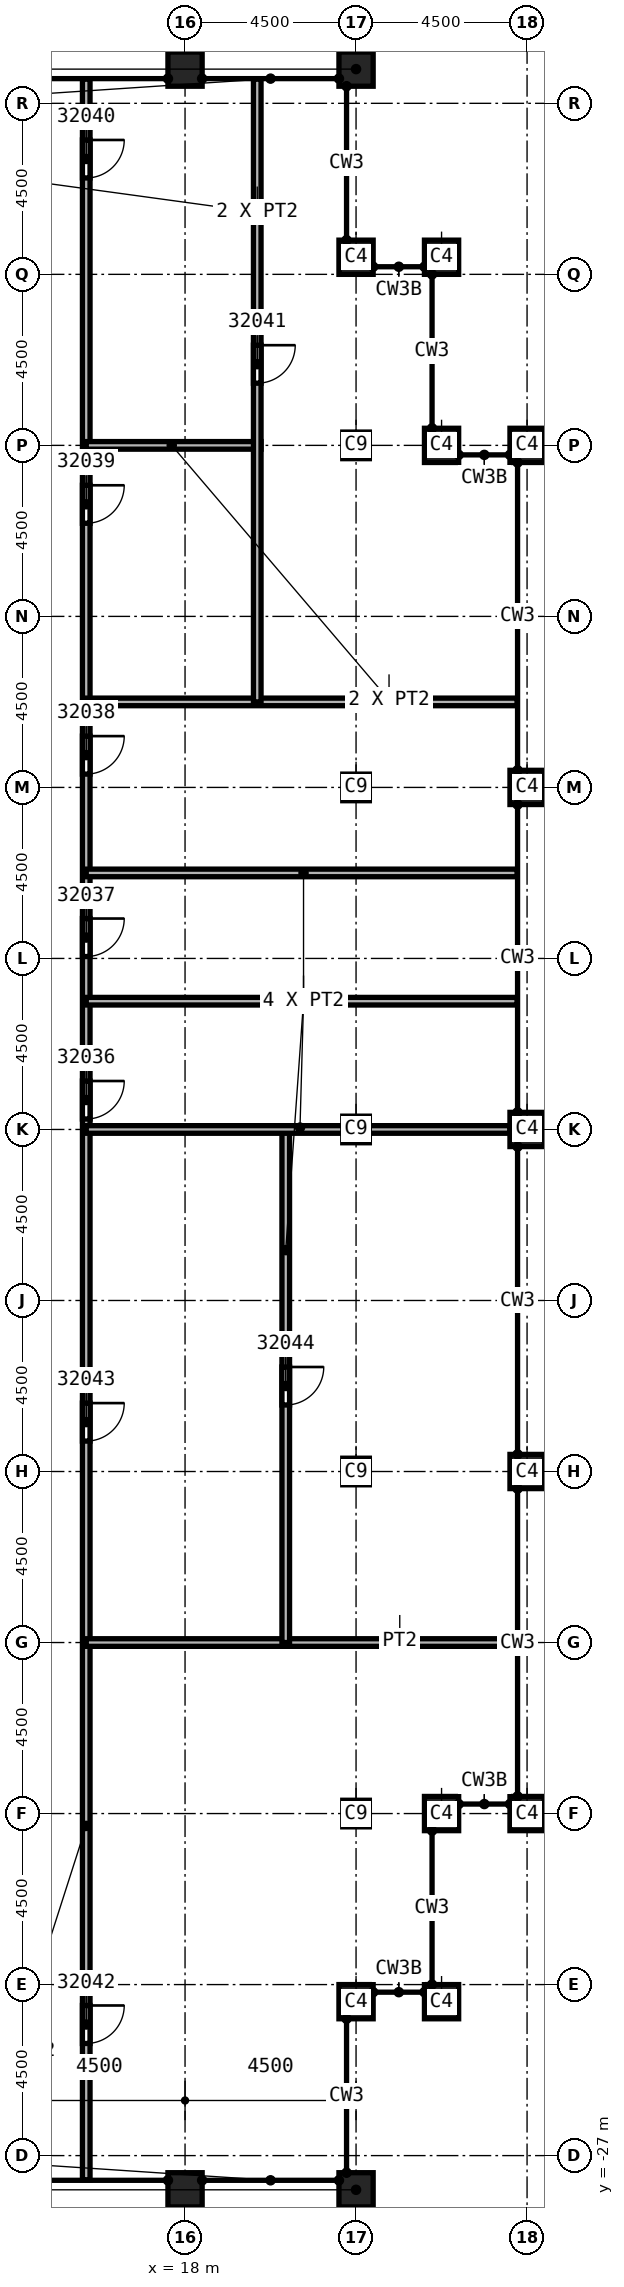
"""IFC4 building model, lengths in metres.
Left out: names, types, materials, properties, quantities, classifications, styles, units other than length and angle.
Written with IfcOpenShell. Run it as: python <this file> out.ifc"""

import sys

from ifc_helpers import new_model, si_unit, direction, frame, frame_2d, origin, origin_2d, place, context, subcontext, project, spatial, rectangle, extrude, element, fill, save


model = new_model("IFC4")
c1 = context("Model", 3, precision=1e-05, world=origin(), true_north=direction((0.0, 1.0)))
c2 = subcontext(c1, "Body", "Model", "MODEL_VIEW")
j1 = project(units=[si_unit("LENGTHUNIT", "METRE"), si_unit("PLANEANGLEUNIT", "RADIAN")], contexts=[c1])
p1 = place(None, origin())
s1 = spatial("IfcSite", under=j1, at=p1, CompositionType="ELEMENT")
p2 = place(p1, origin())
s2 = spatial("IfcBuilding", under=s1, at=p2, CompositionType="ELEMENT")
p3 = place(p2, frame((0.0, 0.0, 356.0)))
s3 = spatial("IfcBuildingStorey", under=s2, at=p3, CompositionType="ELEMENT", Elevation=356.0)
for number, where, z_axis, x_axis in (
    (1, (22.5, 0.0, 0.0), (0.0, 0.0, 1.0), (1.0, 0.0, 0.0)),
    (2, (22.5, 9.0, 0.0), (0.0, 0.0, 1.0), (1.0, 0.0, 0.0)),
    (3, (22.5, 18.0, 0.0), (0.0, 0.0, 1.0), (1.0, 0.0, 0.0)),
    (4, (22.5, -9.0, 0.0), (0.0, 0.0, 1.0), (1.0, 0.0, 0.0)),
    (5, (22.5, -18.0, 0.0), (0.0, 0.0, 1.0), (1.0, 0.0, 0.0)),
):
    element("IfcColumn", number, at=place(p3, frame(where, z_axis=z_axis, x_axis=x_axis)), inside=s3, PredefinedType="COLUMN", context=c2, shape_type="SweptSolid", body=[
        extrude(rectangle(XDim=0.7, YDim=0.7, at=origin_2d()), origin(), (0.0, 0.0, 1.0), 4.6),
    ])
for number, where, z_axis, x_axis in (
    (6, (27.0, 0.0, 0.0), (0.0, 0.0, 1.0), (0.0, 1.0, 0.0)),
    (7, (27.0, 9.0, 0.0), (0.0, 0.0, 1.0), (0.0, 1.0, 0.0)),
    (8, (27.0, 18.0, 0.0), (0.0, 0.0, 1.0), (0.0, 1.0, 0.0)),
    (9, (27.0, -9.0, 0.0), (0.0, 0.0, 1.0), (0.0, 1.0, 0.0)),
    (10, (27.0, -18.0, 0.0), (0.0, 0.0, 1.0), (0.0, 1.0, 0.0)),
    (11, (18.0, 27.9, 0.0), (0.0, 0.0, 1.0), (1.0, 0.0, 0.0)),
    (12, (22.5, 27.9, 0.0), (0.0, 0.0, 1.0), (1.0, 0.0, 0.0)),
    (13, (18.0, -27.9, 0.0), (0.0, 0.0, 1.0), (1.0, 0.0, 0.0)),
    (14, (22.5, -27.9, 0.0), (0.0, 0.0, 1.0), (1.0, 0.0, 0.0)),
    (15, (22.5, 22.95, 0.0), (0.0, 0.0, 1.0), (1.0, 0.0, 0.0)),
    (16, (24.75, 22.95, 0.0), (0.0, 0.0, 1.0), (1.0, 0.0, 0.0)),
    (17, (24.75, 18.0, 0.0), (0.0, 0.0, 1.0), (1.0, 0.0, 0.0)),
    (18, (22.5, -22.95, 0.0), (0.0, 0.0, 1.0), (1.0, 0.0, 0.0)),
    (19, (24.75, -22.95, 0.0), (0.0, 0.0, 1.0), (1.0, 0.0, 0.0)),
    (20, (24.75, -18.0, 0.0), (0.0, 0.0, 1.0), (1.0, 0.0, 0.0)),
):
    element("IfcColumn", number, at=place(p3, frame(where, z_axis=z_axis, x_axis=x_axis)), inside=s3, PredefinedType="COLUMN", context=c2, shape_type="SweptSolid", body=[
        extrude(rectangle(XDim=0.9, YDim=0.9, at=origin_2d()), origin(), (0.0, 0.0, 1.0), 4.6),
    ])
p4 = place(p3, frame((15.4, 27.636, 0.0), z_axis=(0.0, 0.0, 1.0), x_axis=(0.0, -1.0, 0.0)))
e21 = element("IfcWall", 21, at=p4, inside=s3, PredefinedType="PARTITIONING", context=c2, shape_type="SweptSolid", body=[
    extrude(rectangle(XDim=55.272, YDim=0.2, at=frame_2d((27.636, 0.0))), origin(), (0.0, 0.0, 1.0), 4.15),
])
p5 = place(p4, frame((26.361, 0.0, 0.0)))
e22 = element("IfcOpeningElement", 22, at=p5, cuts=e21, PredefinedType="OPENING", context=c2, shape_type="SweptSolid", body=[
    extrude(rectangle(XDim=1.0, YDim=2.1, at=frame_2d((0.5, 1.05))), frame((0.0, 0.1, 0.0), z_axis=(0.0, -1.0, 0.0), x_axis=(1.0, 0.0, 0.0)), (0.0, 0.0, 1.0), 0.2),
])
p6 = place(p4, frame((22.086, 0.0, 0.0)))
e23 = element("IfcOpeningElement", 23, at=p6, cuts=e21, PredefinedType="OPENING", context=c2, shape_type="SweptSolid", body=[
    extrude(rectangle(XDim=1.0, YDim=2.1, at=frame_2d((0.5, 1.05))), frame((0.0, 0.1, 0.0), z_axis=(0.0, -1.0, 0.0), x_axis=(1.0, 0.0, 0.0)), (0.0, 0.0, 1.0), 0.2),
])
p7 = place(p4, frame((17.286, 0.0, 0.0)))
e24 = element("IfcOpeningElement", 24, at=p7, cuts=e21, PredefinedType="OPENING", context=c2, shape_type="SweptSolid", body=[
    extrude(rectangle(XDim=1.0, YDim=2.1, at=frame_2d((0.5, 1.05))), frame((0.0, 0.1, 0.0), z_axis=(0.0, -1.0, 0.0), x_axis=(1.0, 0.0, 0.0)), (0.0, 0.0, 1.0), 0.2),
])
p8 = place(p4, frame((10.686, 0.0, 0.0)))
e25 = element("IfcOpeningElement", 25, at=p8, cuts=e21, PredefinedType="OPENING", context=c2, shape_type="SweptSolid", body=[
    extrude(rectangle(XDim=1.0, YDim=2.1, at=frame_2d((0.5, 1.05))), frame((0.0, 0.1, 0.0), z_axis=(0.0, -1.0, 0.0), x_axis=(1.0, 0.0, 0.0)), (0.0, 0.0, 1.0), 0.2),
])
p9 = place(p4, frame((1.6, 0.0, 0.0)))
e26 = element("IfcOpeningElement", 26, at=p9, cuts=e21, PredefinedType="OPENING", context=c2, shape_type="SweptSolid", body=[
    extrude(rectangle(XDim=1.0, YDim=2.1, at=frame_2d((0.5, 1.05))), frame((0.0, 0.1, 0.0), z_axis=(0.0, -1.0, 0.0), x_axis=(1.0, 0.0, 0.0)), (0.0, 0.0, 1.0), 0.2),
])
p10 = place(p4, frame((50.686, 0.0, 0.0)))
e27 = element("IfcOpeningElement", 27, at=p10, cuts=e21, PredefinedType="OPENING", context=c2, shape_type="SweptSolid", body=[
    extrude(rectangle(XDim=1.0, YDim=2.1, at=frame_2d((0.5, 1.05))), frame((0.0, 0.1, 0.0), z_axis=(0.0, -1.0, 0.0), x_axis=(1.0, 0.0, 0.0)), (0.0, 0.0, 1.0), 0.2),
])
p11 = place(p4, frame((34.836, 0.0, 0.0)))
e28 = element("IfcOpeningElement", 28, at=p11, cuts=e21, PredefinedType="OPENING", context=c2, shape_type="SweptSolid", body=[
    extrude(rectangle(XDim=1.0, YDim=2.1, at=frame_2d((0.5, 1.05))), frame((0.0, 0.1, 0.0), z_axis=(0.0, -1.0, 0.0), x_axis=(1.0, 0.0, 0.0)), (0.0, 0.0, 1.0), 0.2),
])
p12 = place(p3, frame((15.4, -13.5, 0.0), z_axis=(0.0, 0.0, 1.0), x_axis=(1.0, 0.0, 0.0)))
e29 = element("IfcWall", 29, at=p12, inside=s3, PredefinedType="PARTITIONING", context=c2, shape_type="SweptSolid", body=[
    extrude(rectangle(XDim=11.15, YDim=0.2, at=frame_2d((5.575, 0.0))), origin(), (0.0, 0.0, 1.0), 4.15),
])
for number, where, z_axis, x_axis in (
    (30, (15.4, 3.375, 0.0), (0.0, 0.0, 1.0), (1.0, 0.0, 0.0)),
    (31, (15.4, 6.75, 0.0), (0.0, 0.0, 1.0), (1.0, 0.0, 0.0)),
    (32, (15.4, 11.25, 0.0), (0.0, 0.0, 1.0), (1.0, 0.0, 0.0)),
):
    element("IfcWall", number, at=place(p3, frame(where, z_axis=z_axis, x_axis=x_axis)), inside=s3, PredefinedType="PARTITIONING", context=c2, shape_type="SweptSolid", body=[
        extrude(rectangle(XDim=11.336, YDim=0.2, at=frame_2d((5.668, 0.0))), origin(), (0.0, 0.0, 1.0), 4.15),
    ])
p13 = place(p3, frame((15.4, 18.0, 0.0), z_axis=(0.0, 0.0, 1.0), x_axis=(1.0, 0.0, 0.0)))
e33 = element("IfcWall", 33, at=p13, inside=s3, PredefinedType="PARTITIONING", context=c2, shape_type="SweptSolid", body=[
    extrude(rectangle(XDim=4.6, YDim=0.2, at=frame_2d((2.3, 0.0))), origin(), (0.0, 0.0, 1.0), 4.15),
])
p14 = place(p3, frame((19.9, 27.636, 0.0), z_axis=(0.0, 0.0, 1.0), x_axis=(0.0, -1.0, 0.0)))
e34 = element("IfcWall", 34, at=p14, inside=s3, PredefinedType="PARTITIONING", context=c2, shape_type="SweptSolid", body=[
    extrude(rectangle(XDim=16.386, YDim=0.2, at=frame_2d((8.193, 0.0))), origin(), (0.0, 0.0, 1.0), 4.15),
])
p15 = place(p14, frame((7.0, 0.0, 0.0)))
e35 = element("IfcOpeningElement", 35, at=p15, cuts=e34, PredefinedType="OPENING", context=c2, shape_type="SweptSolid", body=[
    extrude(rectangle(XDim=1.0, YDim=2.1, at=frame_2d((0.5, 1.05))), frame((0.0, 0.1, 0.0), z_axis=(0.0, -1.0, 0.0), x_axis=(1.0, 0.0, 0.0)), (0.0, 0.0, 1.0), 0.2),
])
p16 = place(p3, frame((20.65, 0.0, 0.0), z_axis=(0.0, 0.0, 1.0), x_axis=(0.0, -1.0, 0.0)))
e36 = element("IfcWall", 36, at=p16, inside=s3, PredefinedType="PARTITIONING", context=c2, shape_type="SweptSolid", body=[
    extrude(rectangle(XDim=13.5, YDim=0.2, at=frame_2d((6.75, 0.0))), origin(), (0.0, 0.0, 1.0), 4.15),
])
p17 = place(p16, frame((6.25, 0.0, 0.0)))
e37 = element("IfcOpeningElement", 37, at=p17, cuts=e36, PredefinedType="OPENING", context=c2, shape_type="SweptSolid", body=[
    extrude(rectangle(XDim=1.0, YDim=2.1, at=frame_2d((0.5, 1.05))), frame((0.0, 0.1, 0.0), z_axis=(0.0, -1.0, 0.0), x_axis=(1.0, 0.0, 0.0)), (0.0, 0.0, 1.0), 0.2),
])
p18 = place(p3, frame((26.55, 0.0, 0.0), z_axis=(0.0, 0.0, 1.0), x_axis=(-1.0, 0.0, 0.0)))
e38 = element("IfcWall", 38, at=p18, inside=s3, PredefinedType="PARTITIONING", context=c2, shape_type="SweptSolid", body=[
    extrude(rectangle(XDim=11.15, YDim=0.2, at=frame_2d((5.575, 0.0))), origin(), (0.0, 0.0, 1.0), 4.15),
])
p19 = place(p5, origin())
e39 = element("IfcDoor", 39, at=p19, inside=s3, OperationType="SINGLE_SWING_LEFT", PredefinedType="DOOR", context=c2, shape_type="SweptSolid", body=[
    extrude(rectangle(XDim=1.0, YDim=2.1, at=frame_2d((0.5, 1.05))), frame((0.0, 0.025, 0.0), z_axis=(0.0, -1.0, 0.0), x_axis=(1.0, 0.0, 0.0)), (0.0, 0.0, 1.0), 0.05),
])
fill(e22, e39)
p20 = place(p6, origin())
e40 = element("IfcDoor", 40, at=p20, inside=s3, OperationType="SINGLE_SWING_RIGHT", PredefinedType="DOOR", context=c2, shape_type="SweptSolid", body=[
    extrude(rectangle(XDim=1.0, YDim=2.1, at=frame_2d((0.5, 1.05))), frame((0.0, 0.025, 0.0), z_axis=(0.0, -1.0, 0.0), x_axis=(1.0, 0.0, 0.0)), (0.0, 0.0, 1.0), 0.05),
])
fill(e23, e40)
p21 = place(p7, origin())
e41 = element("IfcDoor", 41, at=p21, inside=s3, OperationType="SINGLE_SWING_LEFT", PredefinedType="DOOR", context=c2, shape_type="SweptSolid", body=[
    extrude(rectangle(XDim=1.0, YDim=2.1, at=frame_2d((0.5, 1.05))), frame((0.0, 0.025, 0.0), z_axis=(0.0, -1.0, 0.0), x_axis=(1.0, 0.0, 0.0)), (0.0, 0.0, 1.0), 0.05),
])
fill(e24, e41)
p22 = place(p8, origin())
e42 = element("IfcDoor", 42, at=p22, inside=s3, OperationType="SINGLE_SWING_RIGHT", PredefinedType="DOOR", context=c2, shape_type="SweptSolid", body=[
    extrude(rectangle(XDim=1.0, YDim=2.1, at=frame_2d((0.5, 1.05))), frame((0.0, 0.025, 0.0), z_axis=(0.0, -1.0, 0.0), x_axis=(1.0, 0.0, 0.0)), (0.0, 0.0, 1.0), 0.05),
])
fill(e25, e42)
p23 = place(p9, origin())
e43 = element("IfcDoor", 43, at=p23, inside=s3, OperationType="SINGLE_SWING_LEFT", PredefinedType="DOOR", context=c2, shape_type="SweptSolid", body=[
    extrude(rectangle(XDim=1.0, YDim=2.1, at=frame_2d((0.5, 1.05))), frame((0.0, 0.025, 0.0), z_axis=(0.0, -1.0, 0.0), x_axis=(1.0, 0.0, 0.0)), (0.0, 0.0, 1.0), 0.05),
])
fill(e26, e43)
p24 = place(p15, origin())
e44 = element("IfcDoor", 44, at=p24, inside=s3, OperationType="SINGLE_SWING_RIGHT", PredefinedType="DOOR", context=c2, shape_type="SweptSolid", body=[
    extrude(rectangle(XDim=1.0, YDim=2.1, at=frame_2d((0.5, 1.05))), frame((0.0, 0.025, 0.0), z_axis=(0.0, -1.0, 0.0), x_axis=(1.0, 0.0, 0.0)), (0.0, 0.0, 1.0), 0.05),
])
fill(e35, e44)
p25 = place(p10, origin())
e45 = element("IfcDoor", 45, at=p25, inside=s3, OperationType="SINGLE_SWING_LEFT", PredefinedType="DOOR", context=c2, shape_type="SweptSolid", body=[
    extrude(rectangle(XDim=1.0, YDim=2.1, at=frame_2d((0.5, 1.05))), frame((0.0, 0.025, 0.0), z_axis=(0.0, -1.0, 0.0), x_axis=(1.0, 0.0, 0.0)), (0.0, 0.0, 1.0), 0.05),
])
fill(e27, e45)
p26 = place(p11, origin())
e46 = element("IfcDoor", 46, at=p26, inside=s3, OperationType="SINGLE_SWING_RIGHT", PredefinedType="DOOR", context=c2, shape_type="SweptSolid", body=[
    extrude(rectangle(XDim=1.0, YDim=2.1, at=frame_2d((0.5, 1.05))), frame((0.0, 0.025, 0.0), z_axis=(0.0, -1.0, 0.0), x_axis=(1.0, 0.0, 0.0)), (0.0, 0.0, 1.0), 0.05),
])
fill(e28, e46)
p27 = place(p17, origin())
e47 = element("IfcDoor", 47, at=p27, inside=s3, OperationType="SINGLE_SWING_LEFT", PredefinedType="DOOR", context=c2, shape_type="SweptSolid", body=[
    extrude(rectangle(XDim=1.0, YDim=2.1, at=frame_2d((0.5, 1.05))), frame((0.0, 0.025, 0.0), z_axis=(0.0, -1.0, 0.0), x_axis=(1.0, 0.0, 0.0)), (0.0, 0.0, 1.0), 0.05),
])
fill(e37, e47)
save(model, sys.argv[1])
